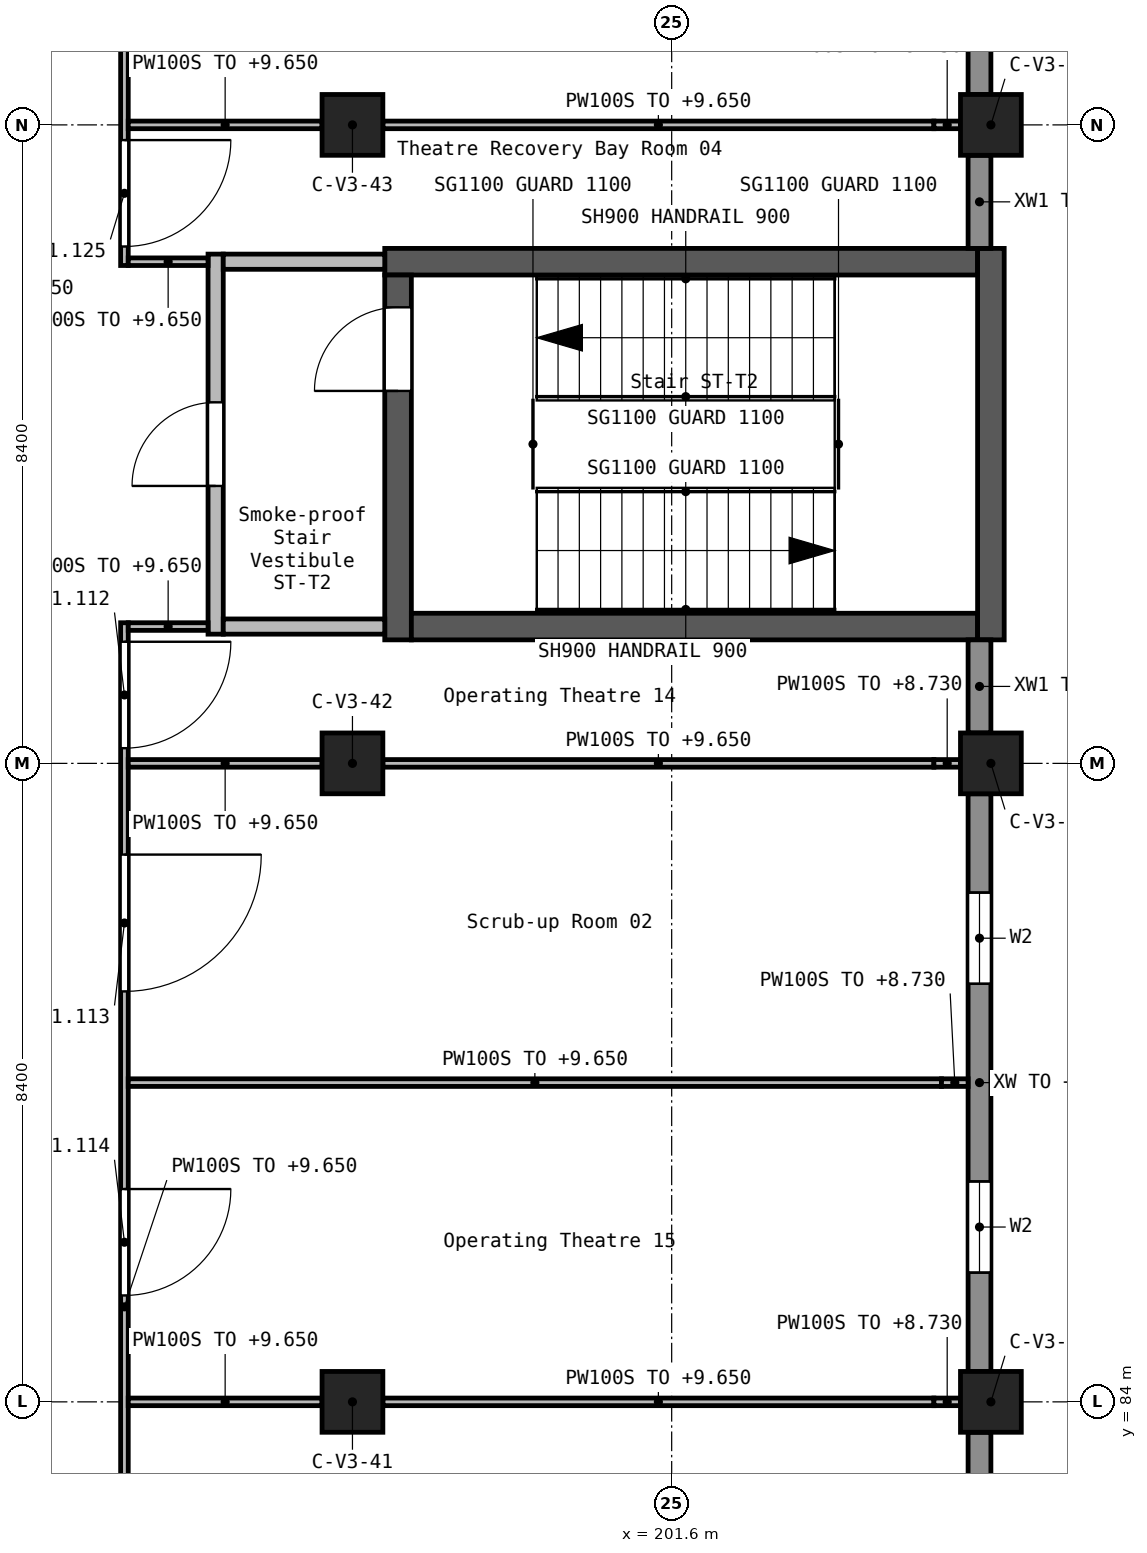
"""IFC4 building model, lengths in metres.
Left out: names, types, materials, properties, quantities, classifications, styles, units other than length and angle.
Written with IfcOpenShell. Run it as: python <this file> out.ifc"""

import sys

from ifc_helpers import new_model, si_unit, direction, frame, frame_2d, origin, origin_2d, place, context, subcontext, project, spatial, rectangle, extrude, element, fill, save


model = new_model("IFC4")
c1 = context("Model", 3, precision=1e-05, world=origin(), true_north=direction((0.0, 1.0)))
c2 = subcontext(c1, "Body", "Model", "MODEL_VIEW")
j1 = project(units=[si_unit("LENGTHUNIT", "METRE"), si_unit("PLANEANGLEUNIT", "RADIAN")], contexts=[c1])
p1 = place(None, origin())
s1 = spatial("IfcSite", under=j1, at=p1, CompositionType="ELEMENT")
p2 = place(p1, origin())
s2 = spatial("IfcBuilding", under=s1, at=p2, CompositionType="ELEMENT")
p3 = place(p2, frame((0.0, 0.0, 5.4)))
s3 = spatial("IfcBuildingStorey", under=s2, at=p3, CompositionType="ELEMENT", Elevation=5.4)
for number, where, z_axis, x_axis in (
    (1, (197.4, 84.0, 0.0), (0.0, 0.0, 1.0), (1.0, 0.0, 0.0)),
    (2, (197.4, 92.4, 0.0), (0.0, 0.0, 1.0), (1.0, 0.0, 0.0)),
    (3, (197.4, 100.8, 0.0), (0.0, 0.0, 1.0), (1.0, 0.0, 0.0)),
    (4, (205.8, 84.0, 0.0), (0.0, 0.0, 1.0), (1.0, 0.0, 0.0)),
    (5, (205.8, 92.4, 0.0), (0.0, 0.0, 1.0), (1.0, 0.0, 0.0)),
    (6, (205.8, 100.8, 0.0), (0.0, 0.0, 1.0), (1.0, 0.0, 0.0)),
):
    element("IfcColumn", number, at=place(p3, frame(where, z_axis=z_axis, x_axis=x_axis)), inside=s3, PredefinedType="COLUMN", context=c2, shape_type="SweptSolid", body=[
        extrude(rectangle(XDim=0.8, YDim=0.8, at=origin_2d()), origin(), (0.0, 0.0, 1.0), 4.5),
    ])
p4 = place(p3, frame((197.825, 99.0, 0.0), z_axis=(0.0, 0.0, 1.0), x_axis=(1.0, 0.0, 0.0)))
e7 = element("IfcWall", 7, at=p4, inside=s3, PredefinedType="SHEAR", context=c2, shape_type="SweptSolid", body=[
    extrude(rectangle(XDim=7.8, YDim=0.35, at=frame_2d((3.9, 0.0))), origin(), (0.0, 0.0, 1.0), 4.5),
])
p5 = place(p3, frame((198.0, 94.025, 0.0), z_axis=(0.0, 0.0, 1.0), x_axis=(0.0, 1.0, 0.0)))
e8 = element("IfcWall", 8, at=p5, inside=s3, PredefinedType="SHEAR", context=c2, shape_type="SweptSolid", body=[
    extrude(rectangle(XDim=4.8, YDim=0.35, at=frame_2d((2.4, 0.0))), origin(), (0.0, 0.0, 1.0), 4.5),
])
p6 = place(p5, frame((3.275, 0.0, 0.0)))
e9 = element("IfcOpeningElement", 9, at=p6, cuts=e8, PredefinedType="OPENING", context=c2, shape_type="SweptSolid", body=[
    extrude(rectangle(XDim=1.1, YDim=2.1, at=frame_2d((0.55, 1.05))), frame((0.0, 0.185, 0.0), z_axis=(0.0, -1.0, 0.0), x_axis=(1.0, 0.0, 0.0)), (0.0, 0.0, 1.0), 0.37),
])
p7 = place(p3, frame((198.175, 94.2, 0.0), z_axis=(0.0, 0.0, 1.0), x_axis=(1.0, 0.0, 0.0)))
e10 = element("IfcWall", 10, at=p7, inside=s3, PredefinedType="SHEAR", context=c2, shape_type="SweptSolid", body=[
    extrude(rectangle(XDim=7.45, YDim=0.35, at=frame_2d((3.725, 0.0))), origin(), (0.0, 0.0, 1.0), 4.5),
])
p8 = place(p3, frame((205.8, 94.025, 0.0), z_axis=(0.0, 0.0, 1.0), x_axis=(0.0, 1.0, 0.0)))
e11 = element("IfcWall", 11, at=p8, inside=s3, PredefinedType="SHEAR", context=c2, shape_type="SweptSolid", body=[
    extrude(rectangle(XDim=5.15, YDim=0.35, at=frame_2d((2.575, 0.0))), origin(), (0.0, 0.0, 1.0), 4.5),
])
p9 = place(p3, frame((205.65, 76.0, 0.0), z_axis=(0.0, 0.0, 1.0), x_axis=(0.0, 1.0, 0.0)))
e12 = element("IfcWall", 12, at=p9, inside=s3, PredefinedType="STANDARD", context=c2, shape_type="SweptSolid", body=[
    extrude(rectangle(XDim=7.6, YDim=0.3, at=frame_2d((3.8, 0.0))), origin(), (0.0, 0.0, 1.0), 3.35),
])
p10 = place(p9, frame((1.3, 0.0, 1.2)))
e13 = element("IfcOpeningElement", 13, at=p10, cuts=e12, PredefinedType="OPENING", context=c2, shape_type="SweptSolid", body=[
    extrude(rectangle(XDim=1.2, YDim=1.2, at=frame_2d((0.6, 0.6))), frame((0.0, 0.16, 0.0), z_axis=(0.0, -1.0, 0.0), x_axis=(1.0, 0.0, 0.0)), (0.0, 0.0, 1.0), 0.32),
])
p11 = place(p9, frame((5.1, 0.0, 1.2)))
e14 = element("IfcOpeningElement", 14, at=p11, cuts=e12, PredefinedType="OPENING", context=c2, shape_type="SweptSolid", body=[
    extrude(rectangle(XDim=1.2, YDim=1.2, at=frame_2d((0.6, 0.6))), frame((0.0, 0.16, 0.0), z_axis=(0.0, -1.0, 0.0), x_axis=(1.0, 0.0, 0.0)), (0.0, 0.0, 1.0), 0.32),
])
p12 = place(p3, frame((205.65, 84.4, 0.0), z_axis=(0.0, 0.0, 1.0), x_axis=(0.0, 1.0, 0.0)))
e15 = element("IfcWall", 15, at=p12, inside=s3, PredefinedType="STANDARD", context=c2, shape_type="SweptSolid", body=[
    extrude(rectangle(XDim=7.6, YDim=0.3, at=frame_2d((3.8, 0.0))), origin(), (0.0, 0.0, 1.0), 3.35),
])
p13 = place(p12, frame((1.3, 0.0, 1.2)))
e16 = element("IfcOpeningElement", 16, at=p13, cuts=e15, PredefinedType="OPENING", context=c2, shape_type="SweptSolid", body=[
    extrude(rectangle(XDim=1.2, YDim=1.2, at=frame_2d((0.6, 0.6))), frame((0.0, 0.16, 0.0), z_axis=(0.0, -1.0, 0.0), x_axis=(1.0, 0.0, 0.0)), (0.0, 0.0, 1.0), 0.32),
])
p14 = place(p12, frame((5.1, 0.0, 1.2)))
e17 = element("IfcOpeningElement", 17, at=p14, cuts=e15, PredefinedType="OPENING", context=c2, shape_type="SweptSolid", body=[
    extrude(rectangle(XDim=1.2, YDim=1.2, at=frame_2d((0.6, 0.6))), frame((0.0, 0.16, 0.0), z_axis=(0.0, -1.0, 0.0), x_axis=(1.0, 0.0, 0.0)), (0.0, 0.0, 1.0), 0.32),
])
for number, where, z_axis, x_axis in (
    (18, (205.65, 92.8, 0.0), (0.0, 0.0, 1.0), (0.0, 1.0, 0.0)),
    (19, (205.65, 99.175, 0.0), (0.0, 0.0, 1.0), (0.0, 1.0, 0.0)),
):
    element("IfcWall", number, at=place(p3, frame(where, z_axis=z_axis, x_axis=x_axis)), inside=s3, PredefinedType="STANDARD", context=c2, shape_type="SweptSolid", body=[
        extrude(rectangle(XDim=1.225, YDim=0.3, at=frame_2d((0.612, 0.0))), origin(), (0.0, 0.0, 1.0), 3.35),
    ])
p15 = place(p3, frame((205.65, 101.2, 0.0), z_axis=(0.0, 0.0, 1.0), x_axis=(0.0, 1.0, 0.0)))
e20 = element("IfcWall", 20, at=p15, inside=s3, PredefinedType="STANDARD", context=c2, shape_type="SweptSolid", body=[
    extrude(rectangle(XDim=7.6, YDim=0.3, at=frame_2d((3.8, 0.0))), origin(), (0.0, 0.0, 1.0), 3.35),
])
p16 = place(p15, frame((1.3, 0.0, 1.2)))
e21 = element("IfcOpeningElement", 21, at=p16, cuts=e20, PredefinedType="OPENING", context=c2, shape_type="SweptSolid", body=[
    extrude(rectangle(XDim=1.2, YDim=1.2, at=frame_2d((0.6, 0.6))), frame((0.0, 0.16, 0.0), z_axis=(0.0, -1.0, 0.0), x_axis=(1.0, 0.0, 0.0)), (0.0, 0.0, 1.0), 0.32),
])
p17 = place(p15, frame((5.1, 0.0, 1.2)))
e22 = element("IfcOpeningElement", 22, at=p17, cuts=e20, PredefinedType="OPENING", context=c2, shape_type="SweptSolid", body=[
    extrude(rectangle(XDim=1.2, YDim=1.2, at=frame_2d((0.6, 0.6))), frame((0.0, 0.16, 0.0), z_axis=(0.0, -1.0, 0.0), x_axis=(1.0, 0.0, 0.0)), (0.0, 0.0, 1.0), 0.32),
])
p18 = place(p3, frame((195.6, 94.1, 0.0), z_axis=(0.0, 0.0, 1.0), x_axis=(0.0, 1.0, 0.0)))
e23 = element("IfcWall", 23, at=p18, inside=s3, PredefinedType="SOLIDWALL", context=c2, shape_type="SweptSolid", body=[
    extrude(rectangle(XDim=5.0, YDim=0.2, at=frame_2d((2.5, 0.0))), origin(), (0.0, 0.0, 1.0), 4.25),
])
p19 = place(p18, frame((1.95, 0.0, 0.0)))
e24 = element("IfcOpeningElement", 24, at=p19, cuts=e23, PredefinedType="OPENING", context=c2, shape_type="SweptSolid", body=[
    extrude(rectangle(XDim=1.1, YDim=2.1, at=frame_2d((0.55, 1.05))), frame((0.0, 0.11, 0.0), z_axis=(0.0, -1.0, 0.0), x_axis=(1.0, 0.0, 0.0)), (0.0, 0.0, 1.0), 0.22),
])
for number, where, z_axis, x_axis in (
    (25, (195.7, 94.2, 0.0), (0.0, 0.0, 1.0), (1.0, 0.0, 0.0)),
    (26, (195.7, 99.0, 0.0), (0.0, 0.0, 1.0), (1.0, 0.0, 0.0)),
):
    element("IfcWall", number, at=place(p3, frame(where, z_axis=z_axis, x_axis=x_axis)), inside=s3, PredefinedType="SOLIDWALL", context=c2, shape_type="SweptSolid", body=[
        extrude(rectangle(XDim=2.125, YDim=0.2, at=frame_2d((1.062, 0.0))), origin(), (0.0, 0.0, 1.0), 4.25),
    ])
p20 = place(p3, frame((194.4, 94.25, 0.0), z_axis=(0.0, 0.0, 1.0), x_axis=(0.0, -1.0, 0.0)))
e27 = element("IfcWall", 27, at=p20, inside=s3, PredefinedType="PARTITIONING", context=c2, shape_type="SweptSolid", body=[
    extrude(rectangle(XDim=18.0, YDim=0.1, at=frame_2d((9.0, 0.0))), origin(), (0.0, 0.0, 1.0), 4.25),
])
p21 = place(p20, frame((0.25, 0.0, 0.0)))
e28 = element("IfcOpeningElement", 28, at=p21, cuts=e27, PredefinedType="OPENING", context=c2, shape_type="SweptSolid", body=[
    extrude(rectangle(XDim=1.4, YDim=2.1, at=frame_2d((0.7, 1.05))), frame((0.0, 0.06, 0.0), z_axis=(0.0, -1.0, 0.0), x_axis=(1.0, 0.0, 0.0)), (0.0, 0.0, 1.0), 0.12),
])
p22 = place(p20, frame((3.05, 0.0, 0.0)))
e29 = element("IfcOpeningElement", 29, at=p22, cuts=e27, PredefinedType="OPENING", context=c2, shape_type="SweptSolid", body=[
    extrude(rectangle(XDim=1.8, YDim=2.1, at=frame_2d((0.9, 1.05))), frame((0.0, 0.06, 0.0), z_axis=(0.0, -1.0, 0.0), x_axis=(1.0, 0.0, 0.0)), (0.0, 0.0, 1.0), 0.12),
])
p23 = place(p20, frame((7.45, 0.0, 0.0)))
e30 = element("IfcOpeningElement", 30, at=p23, cuts=e27, PredefinedType="OPENING", context=c2, shape_type="SweptSolid", body=[
    extrude(rectangle(XDim=1.4, YDim=2.1, at=frame_2d((0.7, 1.05))), frame((0.0, 0.06, 0.0), z_axis=(0.0, -1.0, 0.0), x_axis=(1.0, 0.0, 0.0)), (0.0, 0.0, 1.0), 0.12),
])
p24 = place(p20, frame((12.25, 0.0, 0.0)))
e31 = element("IfcOpeningElement", 31, at=p24, cuts=e27, PredefinedType="OPENING", context=c2, shape_type="SweptSolid", body=[
    extrude(rectangle(XDim=1.4, YDim=2.1, at=frame_2d((0.7, 1.05))), frame((0.0, 0.06, 0.0), z_axis=(0.0, -1.0, 0.0), x_axis=(1.0, 0.0, 0.0)), (0.0, 0.0, 1.0), 0.12),
])
p25 = place(p20, frame((16.45, 0.0, 0.0)))
e32 = element("IfcOpeningElement", 32, at=p25, cuts=e27, PredefinedType="OPENING", context=c2, shape_type="SweptSolid", body=[
    extrude(rectangle(XDim=1.4, YDim=2.1, at=frame_2d((0.7, 1.05))), frame((0.0, 0.06, 0.0), z_axis=(0.0, -1.0, 0.0), x_axis=(1.0, 0.0, 0.0)), (0.0, 0.0, 1.0), 0.12),
])
p26 = place(p3, frame((194.4, 112.7, 0.0), z_axis=(0.0, 0.0, 1.0), x_axis=(0.0, -1.0, 0.0)))
e33 = element("IfcWall", 33, at=p26, inside=s3, PredefinedType="PARTITIONING", context=c2, shape_type="SweptSolid", body=[
    extrude(rectangle(XDim=13.75, YDim=0.1, at=frame_2d((6.875, 0.0))), origin(), (0.0, 0.0, 1.0), 4.25),
])
p27 = place(p26, frame((12.1, 0.0, 0.0)))
e34 = element("IfcOpeningElement", 34, at=p27, cuts=e33, PredefinedType="OPENING", context=c2, shape_type="SweptSolid", body=[
    extrude(rectangle(XDim=1.4, YDim=2.1, at=frame_2d((0.7, 1.05))), frame((0.0, 0.06, 0.0), z_axis=(0.0, -1.0, 0.0), x_axis=(1.0, 0.0, 0.0)), (0.0, 0.0, 1.0), 0.12),
])
p28 = place(p26, frame((8.8, 0.0, 0.0)))
e35 = element("IfcOpeningElement", 35, at=p28, cuts=e33, PredefinedType="OPENING", context=c2, shape_type="SweptSolid", body=[
    extrude(rectangle(XDim=1.4, YDim=2.1, at=frame_2d((0.7, 1.05))), frame((0.0, 0.06, 0.0), z_axis=(0.0, -1.0, 0.0), x_axis=(1.0, 0.0, 0.0)), (0.0, 0.0, 1.0), 0.12),
])
p29 = place(p26, frame((4.85, 0.0, 0.0)))
e36 = element("IfcOpeningElement", 36, at=p29, cuts=e33, PredefinedType="OPENING", context=c2, shape_type="SweptSolid", body=[
    extrude(rectangle(XDim=0.9, YDim=2.1, at=frame_2d((0.45, 1.05))), frame((0.0, 0.06, 0.0), z_axis=(0.0, -1.0, 0.0), x_axis=(1.0, 0.0, 0.0)), (0.0, 0.0, 1.0), 0.12),
])
p30 = place(p26, frame((1.2, 0.0, 0.0)))
e37 = element("IfcOpeningElement", 37, at=p30, cuts=e33, PredefinedType="OPENING", context=c2, shape_type="SweptSolid", body=[
    extrude(rectangle(XDim=1.0, YDim=2.1, at=frame_2d((0.5, 1.05))), frame((0.0, 0.06, 0.0), z_axis=(0.0, -1.0, 0.0), x_axis=(1.0, 0.0, 0.0)), (0.0, 0.0, 1.0), 0.12),
])
p31 = place(p3, frame((194.45, 84.0, 0.0), z_axis=(0.0, 0.0, 1.0), x_axis=(1.0, 0.0, 0.0)))
e38 = element("IfcWall", 38, at=p31, inside=s3, PredefinedType="PARTITIONING", context=c2, shape_type="SweptSolid", body=[
    extrude(rectangle(XDim=2.55, YDim=0.1, at=frame_2d((1.275, 0.0))), origin(), (0.0, 0.0, 1.0), 4.25),
])
p32 = place(p3, frame((197.8, 84.0, 0.0), z_axis=(0.0, 0.0, 1.0), x_axis=(1.0, 0.0, 0.0)))
e39 = element("IfcWall", 39, at=p32, inside=s3, PredefinedType="PARTITIONING", context=c2, shape_type="SweptSolid", body=[
    extrude(rectangle(XDim=7.25, YDim=0.1, at=frame_2d((3.625, 0.0))), origin(), (0.0, 0.0, 1.0), 4.25),
])
p33 = place(p3, frame((205.05, 84.0, 0.0), z_axis=(0.0, 0.0, 1.0), x_axis=(1.0, 0.0, 0.0)))
e40 = element("IfcWall", 40, at=p33, inside=s3, PredefinedType="PARTITIONING", context=c2, shape_type="SweptSolid", body=[
    extrude(rectangle(XDim=0.35, YDim=0.1, at=frame_2d((0.175, 0.0))), origin(), (0.0, 0.0, 1.0), 3.33),
])
p34 = place(p3, frame((194.45, 88.2, 0.0), z_axis=(0.0, 0.0, 1.0), x_axis=(1.0, 0.0, 0.0)))
e41 = element("IfcWall", 41, at=p34, inside=s3, PredefinedType="PARTITIONING", context=c2, shape_type="SweptSolid", body=[
    extrude(rectangle(XDim=10.7, YDim=0.1, at=frame_2d((5.35, 0.0))), origin(), (0.0, 0.0, 1.0), 4.25),
])
p35 = place(p3, frame((205.15, 88.2, 0.0), z_axis=(0.0, 0.0, 1.0), x_axis=(1.0, 0.0, 0.0)))
e42 = element("IfcWall", 42, at=p35, inside=s3, PredefinedType="PARTITIONING", context=c2, shape_type="SweptSolid", body=[
    extrude(rectangle(XDim=0.35, YDim=0.1, at=frame_2d((0.175, 0.0))), origin(), (0.0, 0.0, 1.0), 3.33),
])
p36 = place(p3, frame((194.45, 92.4, 0.0), z_axis=(0.0, 0.0, 1.0), x_axis=(1.0, 0.0, 0.0)))
e43 = element("IfcWall", 43, at=p36, inside=s3, PredefinedType="PARTITIONING", context=c2, shape_type="SweptSolid", body=[
    extrude(rectangle(XDim=2.55, YDim=0.1, at=frame_2d((1.275, 0.0))), origin(), (0.0, 0.0, 1.0), 4.25),
])
p37 = place(p3, frame((197.8, 92.4, 0.0), z_axis=(0.0, 0.0, 1.0), x_axis=(1.0, 0.0, 0.0)))
e44 = element("IfcWall", 44, at=p37, inside=s3, PredefinedType="PARTITIONING", context=c2, shape_type="SweptSolid", body=[
    extrude(rectangle(XDim=7.25, YDim=0.1, at=frame_2d((3.625, 0.0))), origin(), (0.0, 0.0, 1.0), 4.25),
])
p38 = place(p3, frame((205.05, 92.4, 0.0), z_axis=(0.0, 0.0, 1.0), x_axis=(1.0, 0.0, 0.0)))
e45 = element("IfcWall", 45, at=p38, inside=s3, PredefinedType="PARTITIONING", context=c2, shape_type="SweptSolid", body=[
    extrude(rectangle(XDim=0.35, YDim=0.1, at=frame_2d((0.175, 0.0))), origin(), (0.0, 0.0, 1.0), 3.33),
])
p39 = place(p3, frame((194.45, 100.8, 0.0), z_axis=(0.0, 0.0, 1.0), x_axis=(1.0, 0.0, 0.0)))
e46 = element("IfcWall", 46, at=p39, inside=s3, PredefinedType="PARTITIONING", context=c2, shape_type="SweptSolid", body=[
    extrude(rectangle(XDim=2.55, YDim=0.1, at=frame_2d((1.275, 0.0))), origin(), (0.0, 0.0, 1.0), 4.25),
])
p40 = place(p3, frame((197.8, 100.8, 0.0), z_axis=(0.0, 0.0, 1.0), x_axis=(1.0, 0.0, 0.0)))
e47 = element("IfcWall", 47, at=p40, inside=s3, PredefinedType="PARTITIONING", context=c2, shape_type="SweptSolid", body=[
    extrude(rectangle(XDim=7.25, YDim=0.1, at=frame_2d((3.625, 0.0))), origin(), (0.0, 0.0, 1.0), 4.25),
])
p41 = place(p3, frame((205.05, 100.8, 0.0), z_axis=(0.0, 0.0, 1.0), x_axis=(1.0, 0.0, 0.0)))
e48 = element("IfcWall", 48, at=p41, inside=s3, PredefinedType="PARTITIONING", context=c2, shape_type="SweptSolid", body=[
    extrude(rectangle(XDim=0.35, YDim=0.1, at=frame_2d((0.175, 0.0))), origin(), (0.0, 0.0, 1.0), 3.33),
])
for number, where, z_axis, x_axis in (
    (49, (194.45, 94.2, 0.0), (0.0, 0.0, 1.0), (1.0, 0.0, 0.0)),
    (50, (194.45, 99.0, 0.0), (0.0, 0.0, 1.0), (1.0, 0.0, 0.0)),
):
    element("IfcWall", number, at=place(p3, frame(where, z_axis=z_axis, x_axis=x_axis)), inside=s3, PredefinedType="PARTITIONING", context=c2, shape_type="SweptSolid", body=[
        extrude(rectangle(XDim=1.05, YDim=0.1, at=frame_2d((0.525, 0.0))), origin(), (0.0, 0.0, 1.0), 4.25),
    ])
p42 = place(p13, origin())
e51 = element("IfcWindow", 51, at=p42, inside=s3, PartitioningType="SINGLE_PANEL", PredefinedType="WINDOW", context=c2, shape_type="SweptSolid", body=[
    extrude(rectangle(XDim=1.2, YDim=1.2, at=frame_2d((0.6, 0.6))), frame((0.0, 0.03, 0.0), z_axis=(0.0, -1.0, 0.0), x_axis=(1.0, 0.0, 0.0)), (0.0, 0.0, 1.0), 0.06),
])
fill(e16, e51)
p43 = place(p14, origin())
e52 = element("IfcWindow", 52, at=p43, inside=s3, PartitioningType="SINGLE_PANEL", PredefinedType="WINDOW", context=c2, shape_type="SweptSolid", body=[
    extrude(rectangle(XDim=1.2, YDim=1.2, at=frame_2d((0.6, 0.6))), frame((0.0, 0.03, 0.0), z_axis=(0.0, -1.0, 0.0), x_axis=(1.0, 0.0, 0.0)), (0.0, 0.0, 1.0), 0.06),
])
fill(e17, e52)
p44 = place(p6, frame((1.1, 0.0, 0.0), z_axis=(0.0, 0.0, 1.0), x_axis=(-1.0, 0.0, 0.0)))
e53 = element("IfcDoor", 53, at=p44, inside=s3, OperationType="SINGLE_SWING_LEFT", PredefinedType="DOOR", context=c2, shape_type="SweptSolid", body=[
    extrude(rectangle(XDim=1.1, YDim=2.1, at=frame_2d((0.55, 1.05))), frame((0.0, 0.025, 0.0), z_axis=(0.0, -1.0, 0.0), x_axis=(1.0, 0.0, 0.0)), (0.0, 0.0, 1.0), 0.05),
])
fill(e9, e53)
p45 = place(p19, frame((1.1, 0.0, 0.0), z_axis=(0.0, 0.0, 1.0), x_axis=(-1.0, 0.0, 0.0)))
e54 = element("IfcDoor", 54, at=p45, inside=s3, OperationType="SINGLE_SWING_RIGHT", PredefinedType="DOOR", context=c2, shape_type="SweptSolid", body=[
    extrude(rectangle(XDim=1.1, YDim=2.1, at=frame_2d((0.55, 1.05))), frame((0.0, 0.025, 0.0), z_axis=(0.0, -1.0, 0.0), x_axis=(1.0, 0.0, 0.0)), (0.0, 0.0, 1.0), 0.05),
])
fill(e24, e54)
p46 = place(p21, origin())
e55 = element("IfcDoor", 55, at=p46, inside=s3, OperationType="DOUBLE_DOOR_SINGLE_SWING", PredefinedType="DOOR", context=c2, shape_type="SweptSolid", body=[
    extrude(rectangle(XDim=1.4, YDim=2.1, at=frame_2d((0.7, 1.05))), frame((0.0, 0.025, 0.0), z_axis=(0.0, -1.0, 0.0), x_axis=(1.0, 0.0, 0.0)), (0.0, 0.0, 1.0), 0.05),
])
fill(e28, e55)
p47 = place(p22, origin())
e56 = element("IfcDoor", 56, at=p47, inside=s3, OperationType="DOUBLE_DOOR_SINGLE_SWING", PredefinedType="DOOR", context=c2, shape_type="SweptSolid", body=[
    extrude(rectangle(XDim=1.8, YDim=2.1, at=frame_2d((0.9, 1.05))), frame((0.0, 0.025, 0.0), z_axis=(0.0, -1.0, 0.0), x_axis=(1.0, 0.0, 0.0)), (0.0, 0.0, 1.0), 0.05),
])
fill(e29, e56)
p48 = place(p23, origin())
e57 = element("IfcDoor", 57, at=p48, inside=s3, OperationType="DOUBLE_DOOR_SINGLE_SWING", PredefinedType="DOOR", context=c2, shape_type="SweptSolid", body=[
    extrude(rectangle(XDim=1.4, YDim=2.1, at=frame_2d((0.7, 1.05))), frame((0.0, 0.025, 0.0), z_axis=(0.0, -1.0, 0.0), x_axis=(1.0, 0.0, 0.0)), (0.0, 0.0, 1.0), 0.05),
])
fill(e30, e57)
p49 = place(p27, origin())
e58 = element("IfcDoor", 58, at=p49, inside=s3, OperationType="DOUBLE_DOOR_SINGLE_SWING", PredefinedType="DOOR", context=c2, shape_type="SweptSolid", body=[
    extrude(rectangle(XDim=1.4, YDim=2.1, at=frame_2d((0.7, 1.05))), frame((0.0, 0.025, 0.0), z_axis=(0.0, -1.0, 0.0), x_axis=(1.0, 0.0, 0.0)), (0.0, 0.0, 1.0), 0.05),
])
fill(e34, e58)
save(model, sys.argv[1])
